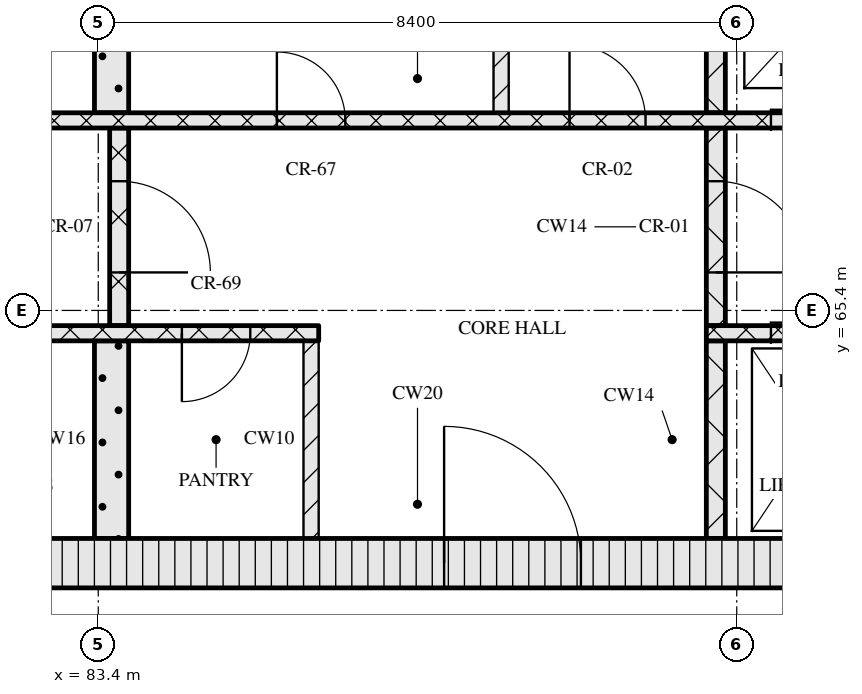
"""IFC4 building model, lengths in metres.
Left out: names, types, materials, properties, quantities, classifications, styles, units other than length and angle.
Written with IfcOpenShell. Run it as: python <this file> out.ifc"""

import sys

from ifc_helpers import new_model, si_unit, direction, frame, frame_2d, origin, place, context, subcontext, project, spatial, rectangle, extrude, element, fill, save


model = new_model("IFC4")
c1 = context("Model", 3, precision=1e-05, world=origin(), true_north=direction((0.0, 1.0)))
c2 = subcontext(c1, "Body", "Model", "MODEL_VIEW")
j1 = project(units=[si_unit("LENGTHUNIT", "METRE"), si_unit("PLANEANGLEUNIT", "RADIAN")], contexts=[c1])
p1 = place(None, origin())
s1 = spatial("IfcSite", under=j1, at=p1, CompositionType="ELEMENT")
p2 = place(p1, origin())
s2 = spatial("IfcBuilding", under=s1, at=p2, CompositionType="ELEMENT")
p3 = place(p2, frame((0.0, 0.0, 248.7)))
s3 = spatial("IfcBuildingStorey", under=s2, at=p3, CompositionType="ELEMENT", Elevation=248.7)
p4 = place(p3, frame((67.15, 62.075, 0.0), z_axis=(0.0, 0.0, 1.0), x_axis=(1.0, 0.0, 0.0)))
e1 = element("IfcWall", 1, at=p4, inside=s3, PredefinedType="SOLIDWALL", context=c2, shape_type="SweptSolid", body=[
    extrude(rectangle(XDim=40.9, YDim=0.65, at=frame_2d((20.45, 0.0))), origin(), (0.0, 0.0, 1.0), 3.3),
])
p5 = place(p4, frame((20.8, 0.0, 0.0)))
e2 = element("IfcOpeningElement", 2, at=p5, cuts=e1, PredefinedType="OPENING", context=c2, shape_type="SweptSolid", body=[
    extrude(rectangle(XDim=1.8, YDim=2.1, at=frame_2d((0.9, 1.05))), frame((0.0, 0.335, 0.0), z_axis=(0.0, -1.0, 0.0), x_axis=(1.0, 0.0, 0.0)), (0.0, 0.0, 1.0), 0.67),
])
p6 = place(p3, frame((83.575, 62.4, 0.0), z_axis=(0.0, 0.0, 1.0), x_axis=(0.0, 1.0, 0.0)))
e3 = element("IfcWall", 3, at=p6, inside=s3, PredefinedType="SOLIDWALL", context=c2, shape_type="SweptSolid", body=[
    extrude(rectangle(XDim=2.6, YDim=0.45, at=frame_2d((1.3, 0.0))), origin(), (0.0, 0.0, 1.0), 3.3),
])
p7 = place(p3, frame((86.2, 62.4, 0.0), z_axis=(0.0, 0.0, 1.0), x_axis=(0.0, 1.0, 0.0)))
e4 = element("IfcWall", 4, at=p7, inside=s3, PredefinedType="PARTITIONING", context=c2, shape_type="SweptSolid", body=[
    extrude(rectangle(XDim=2.6, YDim=0.2, at=frame_2d((1.3, 0.0))), origin(), (0.0, 0.0, 1.0), 3.3),
])
p8 = place(p3, frame((91.525, 62.4, 0.0), z_axis=(0.0, 0.0, 1.0), x_axis=(0.0, 1.0, 0.0)))
e5 = element("IfcWall", 5, at=p8, inside=s3, PredefinedType="SOLIDWALL", context=c2, shape_type="SweptSolid", body=[
    extrude(rectangle(XDim=2.6, YDim=0.25, at=frame_2d((1.3, 0.0))), origin(), (0.0, 0.0, 1.0), 3.3),
])
p9 = place(p3, frame((67.8, 65.1, 0.0), z_axis=(0.0, 0.0, 1.0), x_axis=(1.0, 0.0, 0.0)))
e6 = element("IfcWall", 6, at=p9, inside=s3, PredefinedType="SOLIDWALL", context=c2, shape_type="SweptSolid", body=[
    extrude(rectangle(XDim=18.5, YDim=0.2, at=frame_2d((9.25, 0.0))), origin(), (0.0, 0.0, 1.0), 3.3),
])
p10 = place(p9, frame((7.27, 0.0, 0.0)))
e7 = element("IfcOpeningElement", 7, at=p10, cuts=e6, PredefinedType="OPENING", context=c2, shape_type="SweptSolid", body=[
    extrude(rectangle(XDim=0.9, YDim=2.1, at=frame_2d((0.45, 1.05))), frame((0.0, 0.11, 0.0), z_axis=(0.0, -1.0, 0.0), x_axis=(1.0, 0.0, 0.0)), (0.0, 0.0, 1.0), 0.22),
])
p11 = place(p9, frame((8.95, 0.0, 0.0)))
e8 = element("IfcOpeningElement", 8, at=p11, cuts=e6, PredefinedType="OPENING", context=c2, shape_type="SweptSolid", body=[
    extrude(rectangle(XDim=0.9, YDim=2.1, at=frame_2d((0.45, 1.05))), frame((0.0, 0.11, 0.0), z_axis=(0.0, -1.0, 0.0), x_axis=(1.0, 0.0, 0.0)), (0.0, 0.0, 1.0), 0.22),
])
p12 = place(p9, frame((11.42, 0.0, 0.0)))
e9 = element("IfcOpeningElement", 9, at=p12, cuts=e6, PredefinedType="OPENING", context=c2, shape_type="SweptSolid", body=[
    extrude(rectangle(XDim=0.9, YDim=2.1, at=frame_2d((0.45, 1.05))), frame((0.0, 0.11, 0.0), z_axis=(0.0, -1.0, 0.0), x_axis=(1.0, 0.0, 0.0)), (0.0, 0.0, 1.0), 0.22),
])
p13 = place(p9, frame((13.92, 0.0, 0.0)))
e10 = element("IfcOpeningElement", 10, at=p13, cuts=e6, PredefinedType="OPENING", context=c2, shape_type="SweptSolid", body=[
    extrude(rectangle(XDim=0.9, YDim=2.1, at=frame_2d((0.45, 1.05))), frame((0.0, 0.11, 0.0), z_axis=(0.0, -1.0, 0.0), x_axis=(1.0, 0.0, 0.0)), (0.0, 0.0, 1.0), 0.22),
])
p14 = place(p9, frame((16.7, 0.0, 0.0)))
e11 = element("IfcOpeningElement", 11, at=p14, cuts=e6, PredefinedType="OPENING", context=c2, shape_type="SweptSolid", body=[
    extrude(rectangle(XDim=0.9, YDim=2.1, at=frame_2d((0.45, 1.05))), frame((0.0, 0.11, 0.0), z_axis=(0.0, -1.0, 0.0), x_axis=(1.0, 0.0, 0.0)), (0.0, 0.0, 1.0), 0.22),
])
p15 = place(p3, frame((91.4, 65.1, 0.0), z_axis=(0.0, 0.0, 1.0), x_axis=(1.0, 0.0, 0.0)))
e12 = element("IfcWall", 12, at=p15, inside=s3, PredefinedType="SOLIDWALL", context=c2, shape_type="SweptSolid", body=[
    extrude(rectangle(XDim=16.0, YDim=0.2, at=frame_2d((8.0, 0.0))), origin(), (0.0, 0.0, 1.0), 3.3),
])
p16 = place(p15, frame((0.85, 0.0, 0.0)))
e13 = element("IfcOpeningElement", 13, at=p16, cuts=e12, PredefinedType="OPENING", context=c2, shape_type="SweptSolid", body=[
    extrude(rectangle(XDim=1.1, YDim=2.1, at=frame_2d((0.55, 1.05))), frame((0.0, 0.11, 0.0), z_axis=(0.0, -1.0, 0.0), x_axis=(1.0, 0.0, 0.0)), (0.0, 0.0, 1.0), 0.22),
])
p17 = place(p15, frame((3.35, 0.0, 0.0)))
e14 = element("IfcOpeningElement", 14, at=p17, cuts=e12, PredefinedType="OPENING", context=c2, shape_type="SweptSolid", body=[
    extrude(rectangle(XDim=1.1, YDim=2.1, at=frame_2d((0.55, 1.05))), frame((0.0, 0.11, 0.0), z_axis=(0.0, -1.0, 0.0), x_axis=(1.0, 0.0, 0.0)), (0.0, 0.0, 1.0), 0.22),
])
p18 = place(p15, frame((5.85, 0.0, 0.0)))
e15 = element("IfcOpeningElement", 15, at=p18, cuts=e12, PredefinedType="OPENING", context=c2, shape_type="SweptSolid", body=[
    extrude(rectangle(XDim=1.1, YDim=2.1, at=frame_2d((0.55, 1.05))), frame((0.0, 0.11, 0.0), z_axis=(0.0, -1.0, 0.0), x_axis=(1.0, 0.0, 0.0)), (0.0, 0.0, 1.0), 0.22),
])
p19 = place(p15, frame((7.83, 0.0, 0.0)))
e16 = element("IfcOpeningElement", 16, at=p19, cuts=e12, PredefinedType="OPENING", context=c2, shape_type="SweptSolid", body=[
    extrude(rectangle(XDim=0.9, YDim=2.1, at=frame_2d((0.45, 1.05))), frame((0.0, 0.11, 0.0), z_axis=(0.0, -1.0, 0.0), x_axis=(1.0, 0.0, 0.0)), (0.0, 0.0, 1.0), 0.22),
])
p20 = place(p3, frame((83.675, 65.2, 0.0), z_axis=(0.0, 0.0, 1.0), x_axis=(0.0, 1.0, 0.0)))
e17 = element("IfcWall", 17, at=p20, inside=s3, PredefinedType="SOLIDWALL", context=c2, shape_type="SweptSolid", body=[
    extrude(rectangle(XDim=2.6, YDim=0.25, at=frame_2d((1.3, 0.0))), origin(), (0.0, 0.0, 1.0), 3.3),
])
p21 = place(p20, frame((0.7, 0.0, 0.0)))
e18 = element("IfcOpeningElement", 18, at=p21, cuts=e17, PredefinedType="OPENING", context=c2, shape_type="SweptSolid", body=[
    extrude(rectangle(XDim=1.2, YDim=2.1, at=frame_2d((0.6, 1.05))), frame((0.0, 0.135, 0.0), z_axis=(0.0, -1.0, 0.0), x_axis=(1.0, 0.0, 0.0)), (0.0, 0.0, 1.0), 0.27),
])
p22 = place(p3, frame((91.525, 65.2, 0.0), z_axis=(0.0, 0.0, 1.0), x_axis=(0.0, 1.0, 0.0)))
e19 = element("IfcWall", 19, at=p22, inside=s3, PredefinedType="SOLIDWALL", context=c2, shape_type="SweptSolid", body=[
    extrude(rectangle(XDim=2.6, YDim=0.25, at=frame_2d((1.3, 0.0))), origin(), (0.0, 0.0, 1.0), 3.3),
])
p23 = place(p22, frame((0.7, 0.0, 0.0)))
e20 = element("IfcOpeningElement", 20, at=p23, cuts=e19, PredefinedType="OPENING", context=c2, shape_type="SweptSolid", body=[
    extrude(rectangle(XDim=1.2, YDim=2.1, at=frame_2d((0.6, 1.05))), frame((0.0, 0.135, 0.0), z_axis=(0.0, -1.0, 0.0), x_axis=(1.0, 0.0, 0.0)), (0.0, 0.0, 1.0), 0.27),
])
p24 = place(p3, frame((76.05, 67.9, 0.0), z_axis=(0.0, 0.0, 1.0), x_axis=(1.0, 0.0, 0.0)))
e21 = element("IfcWall", 21, at=p24, inside=s3, PredefinedType="SOLIDWALL", context=c2, shape_type="SweptSolid", body=[
    extrude(rectangle(XDim=23.1, YDim=0.2, at=frame_2d((11.55, 0.0))), origin(), (0.0, 0.0, 1.0), 3.3),
])
p25 = place(p24, frame((1.95, 0.0, 0.0)))
e22 = element("IfcOpeningElement", 22, at=p25, cuts=e21, PredefinedType="OPENING", context=c2, shape_type="SweptSolid", body=[
    extrude(rectangle(XDim=0.9, YDim=2.1, at=frame_2d((0.45, 1.05))), frame((0.0, 0.11, 0.0), z_axis=(0.0, -1.0, 0.0), x_axis=(1.0, 0.0, 0.0)), (0.0, 0.0, 1.0), 0.22),
])
p26 = place(p24, frame((5.66, 0.0, 0.0)))
e23 = element("IfcOpeningElement", 23, at=p26, cuts=e21, PredefinedType="OPENING", context=c2, shape_type="SweptSolid", body=[
    extrude(rectangle(XDim=0.9, YDim=2.1, at=frame_2d((0.45, 1.05))), frame((0.0, 0.11, 0.0), z_axis=(0.0, -1.0, 0.0), x_axis=(1.0, 0.0, 0.0)), (0.0, 0.0, 1.0), 0.22),
])
p27 = place(p24, frame((9.7, 0.0, 0.0)))
e24 = element("IfcOpeningElement", 24, at=p27, cuts=e21, PredefinedType="OPENING", context=c2, shape_type="SweptSolid", body=[
    extrude(rectangle(XDim=0.9, YDim=2.1, at=frame_2d((0.45, 1.05))), frame((0.0, 0.11, 0.0), z_axis=(0.0, -1.0, 0.0), x_axis=(1.0, 0.0, 0.0)), (0.0, 0.0, 1.0), 0.22),
])
p28 = place(p24, frame((13.55, 0.0, 0.0)))
e25 = element("IfcOpeningElement", 25, at=p28, cuts=e21, PredefinedType="OPENING", context=c2, shape_type="SweptSolid", body=[
    extrude(rectangle(XDim=1.0, YDim=2.1, at=frame_2d((0.5, 1.05))), frame((0.0, 0.11, 0.0), z_axis=(0.0, -1.0, 0.0), x_axis=(1.0, 0.0, 0.0)), (0.0, 0.0, 1.0), 0.22),
])
p29 = place(p24, frame((16.2, 0.0, 0.0)))
e26 = element("IfcOpeningElement", 26, at=p29, cuts=e21, PredefinedType="OPENING", context=c2, shape_type="SweptSolid", body=[
    extrude(rectangle(XDim=1.1, YDim=2.1, at=frame_2d((0.55, 1.05))), frame((0.0, 0.11, 0.0), z_axis=(0.0, -1.0, 0.0), x_axis=(1.0, 0.0, 0.0)), (0.0, 0.0, 1.0), 0.22),
])
p30 = place(p24, frame((18.7, 0.0, 0.0)))
e27 = element("IfcOpeningElement", 27, at=p30, cuts=e21, PredefinedType="OPENING", context=c2, shape_type="SweptSolid", body=[
    extrude(rectangle(XDim=1.1, YDim=2.1, at=frame_2d((0.55, 1.05))), frame((0.0, 0.11, 0.0), z_axis=(0.0, -1.0, 0.0), x_axis=(1.0, 0.0, 0.0)), (0.0, 0.0, 1.0), 0.22),
])
p31 = place(p24, frame((21.2, 0.0, 0.0)))
e28 = element("IfcOpeningElement", 28, at=p31, cuts=e21, PredefinedType="OPENING", context=c2, shape_type="SweptSolid", body=[
    extrude(rectangle(XDim=1.1, YDim=2.1, at=frame_2d((0.55, 1.05))), frame((0.0, 0.11, 0.0), z_axis=(0.0, -1.0, 0.0), x_axis=(1.0, 0.0, 0.0)), (0.0, 0.0, 1.0), 0.22),
])
p32 = place(p3, frame((83.575, 68.0, 0.0), z_axis=(0.0, 0.0, 1.0), x_axis=(0.0, 1.0, 0.0)))
e29 = element("IfcWall", 29, at=p32, inside=s3, PredefinedType="SOLIDWALL", context=c2, shape_type="SweptSolid", body=[
    extrude(rectangle(XDim=2.6, YDim=0.45, at=frame_2d((1.3, 0.0))), origin(), (0.0, 0.0, 1.0), 3.3),
])
p33 = place(p3, frame((88.7, 68.0, 0.0), z_axis=(0.0, 0.0, 1.0), x_axis=(0.0, 1.0, 0.0)))
e30 = element("IfcWall", 30, at=p33, inside=s3, PredefinedType="PARTITIONING", context=c2, shape_type="SweptSolid", body=[
    extrude(rectangle(XDim=2.6, YDim=0.2, at=frame_2d((1.3, 0.0))), origin(), (0.0, 0.0, 1.0), 3.3),
])
p34 = place(p3, frame((91.525, 68.0, 0.0), z_axis=(0.0, 0.0, 1.0), x_axis=(0.0, 1.0, 0.0)))
e31 = element("IfcWall", 31, at=p34, inside=s3, PredefinedType="SOLIDWALL", context=c2, shape_type="SweptSolid", body=[
    extrude(rectangle(XDim=2.6, YDim=0.25, at=frame_2d((1.3, 0.0))), origin(), (0.0, 0.0, 1.0), 3.3),
])
p35 = place(p5, origin())
e32 = element("IfcDoor", 32, at=p35, inside=s3, OperationType="DOUBLE_DOOR_SINGLE_SWING", PredefinedType="DOOR", context=c2, shape_type="SweptSolid", body=[
    extrude(rectangle(XDim=1.8, YDim=2.1, at=frame_2d((0.9, 1.05))), frame((0.0, 0.025, 0.0), z_axis=(0.0, -1.0, 0.0), x_axis=(1.0, 0.0, 0.0)), (0.0, 0.0, 1.0), 0.05),
])
fill(e2, e32)
p36 = place(p14, origin())
e33 = element("IfcDoor", 33, at=p36, inside=s3, OperationType="SINGLE_SWING_RIGHT", PredefinedType="DOOR", context=c2, shape_type="SweptSolid", body=[
    extrude(rectangle(XDim=0.9, YDim=2.1, at=frame_2d((0.45, 1.05))), frame((0.0, 0.025, 0.0), z_axis=(0.0, -1.0, 0.0), x_axis=(1.0, 0.0, 0.0)), (0.0, 0.0, 1.0), 0.05),
])
fill(e11, e33)
p37 = place(p16, origin())
e34 = element("IfcDoor", 34, at=p37, inside=s3, OperationType="SLIDING_TO_LEFT", PredefinedType="DOOR", context=c2, shape_type="SweptSolid", body=[
    extrude(rectangle(XDim=1.1, YDim=2.1, at=frame_2d((0.55, 1.05))), frame((0.0, 0.025, 0.0), z_axis=(0.0, -1.0, 0.0), x_axis=(1.0, 0.0, 0.0)), (0.0, 0.0, 1.0), 0.05),
])
fill(e13, e34)
p38 = place(p21, origin())
e35 = element("IfcDoor", 35, at=p38, inside=s3, OperationType="SINGLE_SWING_RIGHT", PredefinedType="DOOR", context=c2, shape_type="SweptSolid", body=[
    extrude(rectangle(XDim=1.2, YDim=2.1, at=frame_2d((0.6, 1.05))), frame((0.0, 0.025, 0.0), z_axis=(0.0, -1.0, 0.0), x_axis=(1.0, 0.0, 0.0)), (0.0, 0.0, 1.0), 0.05),
])
fill(e18, e35)
p39 = place(p23, origin())
e36 = element("IfcDoor", 36, at=p39, inside=s3, OperationType="SINGLE_SWING_RIGHT", PredefinedType="DOOR", context=c2, shape_type="SweptSolid", body=[
    extrude(rectangle(XDim=1.2, YDim=2.1, at=frame_2d((0.6, 1.05))), frame((0.0, 0.025, 0.0), z_axis=(0.0, -1.0, 0.0), x_axis=(1.0, 0.0, 0.0)), (0.0, 0.0, 1.0), 0.05),
])
fill(e20, e36)
p40 = place(p27, origin())
e37 = element("IfcDoor", 37, at=p40, inside=s3, OperationType="SINGLE_SWING_LEFT", PredefinedType="DOOR", context=c2, shape_type="SweptSolid", body=[
    extrude(rectangle(XDim=0.9, YDim=2.1, at=frame_2d((0.45, 1.05))), frame((0.0, 0.025, 0.0), z_axis=(0.0, -1.0, 0.0), x_axis=(1.0, 0.0, 0.0)), (0.0, 0.0, 1.0), 0.05),
])
fill(e24, e37)
p41 = place(p28, origin())
e38 = element("IfcDoor", 38, at=p41, inside=s3, OperationType="SINGLE_SWING_LEFT", PredefinedType="DOOR", context=c2, shape_type="SweptSolid", body=[
    extrude(rectangle(XDim=1.0, YDim=2.1, at=frame_2d((0.5, 1.05))), frame((0.0, 0.025, 0.0), z_axis=(0.0, -1.0, 0.0), x_axis=(1.0, 0.0, 0.0)), (0.0, 0.0, 1.0), 0.05),
])
fill(e25, e38)
p42 = place(p29, origin())
e39 = element("IfcDoor", 39, at=p42, inside=s3, OperationType="SLIDING_TO_RIGHT", PredefinedType="DOOR", context=c2, shape_type="SweptSolid", body=[
    extrude(rectangle(XDim=1.1, YDim=2.1, at=frame_2d((0.55, 1.05))), frame((0.0, 0.025, 0.0), z_axis=(0.0, -1.0, 0.0), x_axis=(1.0, 0.0, 0.0)), (0.0, 0.0, 1.0), 0.05),
])
fill(e26, e39)
save(model, sys.argv[1])
